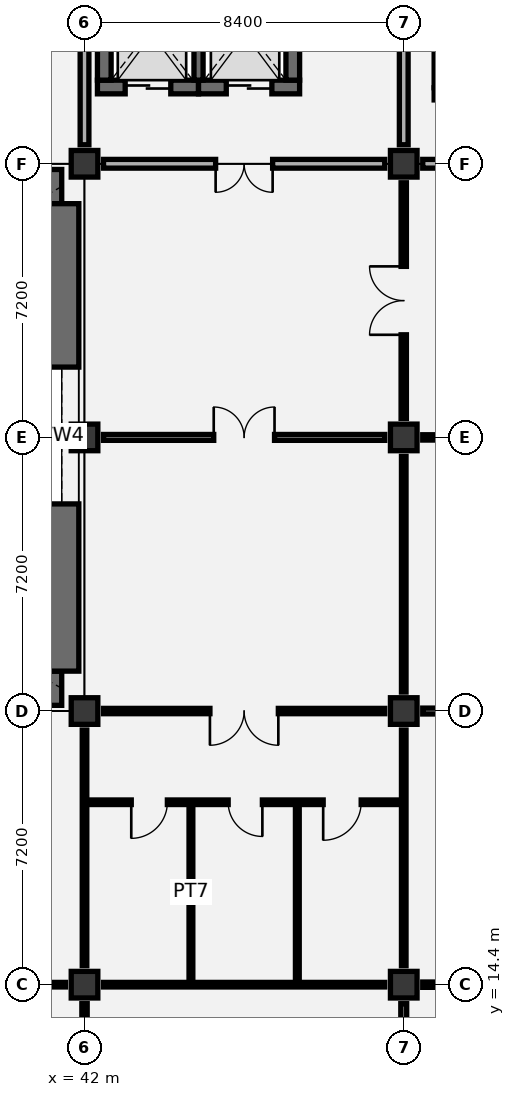
"""IFC4 building model, lengths in metres.
Left out: names, types, materials, properties, quantities, classifications, styles, units other than length and angle.
Written with IfcOpenShell. Run it as: python <this file> out.ifc"""

import sys

from ifc_helpers import new_model, si_unit, direction, frame, frame_2d, origin, origin_2d, place, context, subcontext, project, spatial, rectangle, extrude, element, fill, save


model = new_model("IFC4")
c1 = context("Model", 3, precision=1e-05, world=origin(), true_north=direction((0.0, 1.0)))
c2 = subcontext(c1, "Body", "Model", "MODEL_VIEW")
j1 = project(units=[si_unit("LENGTHUNIT", "METRE"), si_unit("PLANEANGLEUNIT", "RADIAN")], contexts=[c1])
p1 = place(None, origin())
s1 = spatial("IfcSite", under=j1, at=p1, CompositionType="ELEMENT")
p2 = place(p1, origin())
s2 = spatial("IfcBuilding", under=s1, at=p2, CompositionType="ELEMENT")
p3 = place(p2, origin())
s3 = spatial("IfcBuildingStorey", under=s2, at=p3, CompositionType="ELEMENT", Elevation=0.0)
for number, where, z_axis, x_axis in (
    (1, (42.0, 14.4, 0.0), (0.0, 0.0, 1.0), (1.0, 0.0, 0.0)),
    (2, (42.0, 21.6, 0.0), (0.0, 0.0, 1.0), (1.0, 0.0, 0.0)),
    (3, (42.0, 28.8, 0.0), (0.0, 0.0, 1.0), (1.0, 0.0, 0.0)),
    (4, (42.0, 36.0, 0.0), (0.0, 0.0, 1.0), (1.0, 0.0, 0.0)),
    (5, (50.4, 14.4, 0.0), (0.0, 0.0, 1.0), (1.0, 0.0, 0.0)),
    (6, (50.4, 21.6, 0.0), (0.0, 0.0, 1.0), (1.0, 0.0, 0.0)),
    (7, (50.4, 28.8, 0.0), (0.0, 0.0, 1.0), (1.0, 0.0, 0.0)),
    (8, (50.4, 36.0, 0.0), (0.0, 0.0, 1.0), (1.0, 0.0, 0.0)),
):
    element("IfcColumn", number, at=place(p3, frame(where, z_axis=z_axis, x_axis=x_axis)), inside=s3, PredefinedType="COLUMN", context=c2, shape_type="SweptSolid", body=[
        extrude(rectangle(XDim=0.7, YDim=0.7, at=origin_2d()), origin(), (0.0, 0.0, 1.0), 6.0),
    ])
p4 = place(p3, frame((17.4, 22.2, 0.0), z_axis=(0.0, 0.0, 1.0), x_axis=(1.0, 0.0, 0.0)))
e9 = element("IfcWall", 9, at=p4, inside=s3, PredefinedType="SOLIDWALL", context=c2, shape_type="SweptSolid", body=[
    extrude(rectangle(XDim=24.0, YDim=0.9, at=frame_2d((12.0, 0.0))), origin(), (0.0, 0.0, 1.0), 6.0),
])
p5 = place(p4, frame((2.4, 0.0, 0.8)))
e10 = element("IfcOpeningElement", 10, at=p5, cuts=e9, PredefinedType="OPENING", context=c2, shape_type="SweptSolid", body=[
    extrude(rectangle(XDim=6.4, YDim=3.2, at=frame_2d((3.2, 1.6))), frame((0.0, 0.46, 0.0), z_axis=(0.0, -1.0, 0.0), x_axis=(1.0, 0.0, 0.0)), (0.0, 0.0, 1.0), 0.92),
])
p6 = place(p4, frame((14.2, 0.0, 0.8)))
e11 = element("IfcOpeningElement", 11, at=p6, cuts=e9, PredefinedType="OPENING", context=c2, shape_type="SweptSolid", body=[
    extrude(rectangle(XDim=6.4, YDim=3.2, at=frame_2d((3.2, 1.6))), frame((0.0, 0.46, 0.0), z_axis=(0.0, -1.0, 0.0), x_axis=(1.0, 0.0, 0.0)), (0.0, 0.0, 1.0), 0.92),
])
p7 = place(p3, frame((17.4, 35.4, 0.0), z_axis=(0.0, 0.0, 1.0), x_axis=(1.0, 0.0, 0.0)))
e12 = element("IfcWall", 12, at=p7, inside=s3, PredefinedType="SOLIDWALL", context=c2, shape_type="SweptSolid", body=[
    extrude(rectangle(XDim=24.0, YDim=0.9, at=frame_2d((12.0, 0.0))), origin(), (0.0, 0.0, 1.0), 6.0),
])
p8 = place(p7, frame((2.4, 0.0, 0.8)))
e13 = element("IfcOpeningElement", 13, at=p8, cuts=e12, PredefinedType="OPENING", context=c2, shape_type="SweptSolid", body=[
    extrude(rectangle(XDim=6.4, YDim=3.2, at=frame_2d((3.2, 1.6))), frame((0.0, 0.46, 0.0), z_axis=(0.0, -1.0, 0.0), x_axis=(1.0, 0.0, 0.0)), (0.0, 0.0, 1.0), 0.92),
])
p9 = place(p7, frame((14.2, 0.0, 0.8)))
e14 = element("IfcOpeningElement", 14, at=p9, cuts=e12, PredefinedType="OPENING", context=c2, shape_type="SweptSolid", body=[
    extrude(rectangle(XDim=6.4, YDim=3.2, at=frame_2d((3.2, 1.6))), frame((0.0, 0.46, 0.0), z_axis=(0.0, -1.0, 0.0), x_axis=(1.0, 0.0, 0.0)), (0.0, 0.0, 1.0), 0.92),
])
p10 = place(p3, frame((41.4, 22.65, 0.0), z_axis=(0.0, 0.0, 1.0), x_axis=(0.0, 1.0, 0.0)))
e15 = element("IfcWall", 15, at=p10, inside=s3, PredefinedType="SOLIDWALL", context=c2, shape_type="SweptSolid", body=[
    extrude(rectangle(XDim=12.3, YDim=0.9, at=frame_2d((6.15, 0.0))), origin(), (0.0, 0.0, 1.0), 6.0),
])
p11 = place(p10, frame((4.4, 0.0, 0.9)))
e16 = element("IfcOpeningElement", 16, at=p11, cuts=e15, PredefinedType="OPENING", context=c2, shape_type="SweptSolid", body=[
    extrude(rectangle(XDim=3.6, YDim=2.6, at=frame_2d((1.8, 1.3))), frame((0.0, 0.46, 0.0), z_axis=(0.0, -1.0, 0.0), x_axis=(1.0, 0.0, 0.0)), (0.0, 0.0, 1.0), 0.92),
])
p12 = place(p3, frame((51.2, 37.84, 0.0), z_axis=(0.0, 0.0, 1.0), x_axis=(1.0, 0.0, 0.0)))
e17 = element("IfcWall", 17, at=p12, inside=s3, PredefinedType="SHEAR", context=c2, shape_type="SweptSolid", body=[
    extrude(rectangle(XDim=7.48, YDim=0.32, at=frame_2d((3.74, 0.0))), origin(), (0.0, 0.0, 1.0), 5.675),
])
p13 = place(p12, frame((0.45, 0.0, 0.0)))
e18 = element("IfcOpeningElement", 18, at=p13, cuts=e17, PredefinedType="OPENING", context=c2, shape_type="SweptSolid", body=[
    extrude(rectangle(XDim=1.05, YDim=2.15, at=frame_2d((0.525, 1.075))), frame((0.0, 0.17, 0.0), z_axis=(0.0, -1.0, 0.0), x_axis=(1.0, 0.0, 0.0)), (0.0, 0.0, 1.0), 0.34),
])
p14 = place(p3, frame((51.36, 38.0, 0.0), z_axis=(0.0, 0.0, 1.0), x_axis=(0.0, 1.0, 0.0)))
e19 = element("IfcWall", 19, at=p14, inside=s3, PredefinedType="SHEAR", context=c2, shape_type="SweptSolid", body=[
    extrude(rectangle(XDim=3.8, YDim=0.32, at=frame_2d((1.9, 0.0))), origin(), (0.0, 0.0, 1.0), 5.675),
])
p15 = place(p3, frame((42.34, 38.02, 0.0), z_axis=(0.0, 0.0, 1.0), x_axis=(1.0, 0.0, 0.0)))
e20 = element("IfcWall", 20, at=p15, inside=s3, PredefinedType="SHEAR", context=c2, shape_type="SweptSolid", body=[
    extrude(rectangle(XDim=2.66, YDim=0.36, at=frame_2d((1.33, 0.0))), origin(), (0.0, 0.0, 1.0), 5.675),
])
p16 = place(p15, frame((0.73, 0.0, 0.0)))
e21 = element("IfcOpeningElement", 21, at=p16, cuts=e20, PredefinedType="OPENING", context=c2, shape_type="SweptSolid", body=[
    extrude(rectangle(XDim=1.2, YDim=2.15, at=frame_2d((0.6, 1.075))), frame((0.0, 0.19, 0.0), z_axis=(0.0, -1.0, 0.0), x_axis=(1.0, 0.0, 0.0)), (0.0, 0.0, 1.0), 0.38),
])
p17 = place(p3, frame((45.0, 38.02, 0.0), z_axis=(0.0, 0.0, 1.0), x_axis=(1.0, 0.0, 0.0)))
e22 = element("IfcWall", 22, at=p17, inside=s3, PredefinedType="SHEAR", context=c2, shape_type="SweptSolid", body=[
    extrude(rectangle(XDim=2.66, YDim=0.36, at=frame_2d((1.33, 0.0))), origin(), (0.0, 0.0, 1.0), 5.675),
])
p18 = place(p17, frame((0.73, 0.0, 0.0)))
e23 = element("IfcOpeningElement", 23, at=p18, cuts=e22, PredefinedType="OPENING", context=c2, shape_type="SweptSolid", body=[
    extrude(rectangle(XDim=1.2, YDim=2.15, at=frame_2d((0.6, 1.075))), frame((0.0, 0.19, 0.0), z_axis=(0.0, -1.0, 0.0), x_axis=(1.0, 0.0, 0.0)), (0.0, 0.0, 1.0), 0.38),
])
for number, where, z_axis, x_axis in (
    (24, (42.52, 38.2, 0.0), (0.0, 0.0, 1.0), (0.0, 1.0, 0.0)),
    (25, (47.48, 38.2, 0.0), (0.0, 0.0, 1.0), (0.0, 1.0, 0.0)),
):
    element("IfcWall", number, at=place(p3, frame(where, z_axis=z_axis, x_axis=x_axis)), inside=s3, PredefinedType="SHEAR", context=c2, shape_type="SweptSolid", body=[
        extrude(rectangle(XDim=2.8, YDim=0.36, at=frame_2d((1.4, 0.0))), origin(), (0.0, 0.0, 1.0), 5.675),
    ])
p19 = place(p3, frame((45.0, 38.2, 0.0), z_axis=(0.0, 0.0, 1.0), x_axis=(0.0, 1.0, 0.0)))
e26 = element("IfcWall", 26, at=p19, inside=s3, PredefinedType="SHEAR", context=c2, shape_type="SweptSolid", body=[
    extrude(rectangle(XDim=2.8, YDim=0.24, at=frame_2d((1.4, 0.0))), origin(), (0.0, 0.0, 1.0), 5.675),
])
p20 = place(p3, frame((42.15, 19.2, 0.0), z_axis=(0.0, 0.0, 1.0), x_axis=(1.0, 0.0, 0.0)))
e27 = element("IfcWall", 27, at=p20, inside=s3, PredefinedType="PARTITIONING", context=c2, shape_type="SweptSolid", body=[
    extrude(rectangle(XDim=8.1, YDim=0.12, at=frame_2d((4.05, 0.0))), origin(), (0.0, 0.0, 1.0), 5.675),
])
p21 = place(p20, frame((1.08, 0.0, 0.0)))
e28 = element("IfcOpeningElement", 28, at=p21, cuts=e27, PredefinedType="OPENING", context=c2, shape_type="SweptSolid", body=[
    extrude(rectangle(XDim=0.95, YDim=2.1, at=frame_2d((0.475, 1.05))), frame((0.0, 0.07, 0.0), z_axis=(0.0, -1.0, 0.0), x_axis=(1.0, 0.0, 0.0)), (0.0, 0.0, 1.0), 0.14),
])
p22 = place(p20, frame((3.63, 0.0, 0.0)))
e29 = element("IfcOpeningElement", 29, at=p22, cuts=e27, PredefinedType="OPENING", context=c2, shape_type="SweptSolid", body=[
    extrude(rectangle(XDim=0.9, YDim=2.1, at=frame_2d((0.45, 1.05))), frame((0.0, 0.07, 0.0), z_axis=(0.0, -1.0, 0.0), x_axis=(1.0, 0.0, 0.0)), (0.0, 0.0, 1.0), 0.14),
])
p23 = place(p20, frame((6.13, 0.0, 0.0)))
e30 = element("IfcOpeningElement", 30, at=p23, cuts=e27, PredefinedType="OPENING", context=c2, shape_type="SweptSolid", body=[
    extrude(rectangle(XDim=1.0, YDim=2.1, at=frame_2d((0.5, 1.05))), frame((0.0, 0.07, 0.0), z_axis=(0.0, -1.0, 0.0), x_axis=(1.0, 0.0, 0.0)), (0.0, 0.0, 1.0), 0.14),
])
for number, where, z_axis, x_axis in (
    (31, (44.8, 14.55, 0.0), (0.0, 0.0, 1.0), (0.0, 1.0, 0.0)),
    (32, (47.6, 14.55, 0.0), (0.0, 0.0, 1.0), (0.0, 1.0, 0.0)),
):
    element("IfcWall", number, at=place(p3, frame(where, z_axis=z_axis, x_axis=x_axis)), inside=s3, PredefinedType="PARTITIONING", context=c2, shape_type="SweptSolid", body=[
        extrude(rectangle(XDim=4.59, YDim=0.1, at=frame_2d((2.295, 0.0))), origin(), (0.0, 0.0, 1.0), 5.675),
    ])
p24 = place(p3, frame((42.0, 7.7, 0.0), z_axis=(0.0, 0.0, 1.0), x_axis=(0.0, 1.0, 0.0)))
e33 = element("IfcWall", 33, at=p24, inside=s3, PredefinedType="PARTITIONING", context=c2, shape_type="SweptSolid", body=[
    extrude(rectangle(XDim=6.2, YDim=0.14, at=frame_2d((3.1, 0.0))), origin(), (0.0, 0.0, 1.0), 5.27),
])
p25 = place(p24, frame((2.3, 0.0, 0.0)))
e34 = element("IfcOpeningElement", 34, at=p25, cuts=e33, PredefinedType="OPENING", context=c2, shape_type="SweptSolid", body=[
    extrude(rectangle(XDim=1.6, YDim=2.2, at=frame_2d((0.8, 1.1))), frame((0.0, 0.08, 0.0), z_axis=(0.0, -1.0, 0.0), x_axis=(1.0, 0.0, 0.0)), (0.0, 0.0, 1.0), 0.16),
])
p26 = place(p3, frame((34.1, 14.4, 0.0), z_axis=(0.0, 0.0, 1.0), x_axis=(1.0, 0.0, 0.0)))
e35 = element("IfcWall", 35, at=p26, inside=s3, PredefinedType="PARTITIONING", context=c2, shape_type="SweptSolid", body=[
    extrude(rectangle(XDim=7.4, YDim=0.12, at=frame_2d((3.7, 0.0))), origin(), (0.0, 0.0, 1.0), 5.02),
])
p27 = place(p3, frame((42.0, 14.9, 0.0), z_axis=(0.0, 0.0, 1.0), x_axis=(0.0, 1.0, 0.0)))
e36 = element("IfcWall", 36, at=p27, inside=s3, PredefinedType="PARTITIONING", context=c2, shape_type="SweptSolid", body=[
    extrude(rectangle(XDim=6.2, YDim=0.12, at=frame_2d((3.1, 0.0))), origin(), (0.0, 0.0, 1.0), 5.02),
])
p28 = place(p3, frame((42.0, 36.5, 0.0), z_axis=(0.0, 0.0, 1.0), x_axis=(0.0, 1.0, 0.0)))
e37 = element("IfcWall", 37, at=p28, inside=s3, PredefinedType="PARTITIONING", context=c2, shape_type="SweptSolid", body=[
    extrude(rectangle(XDim=6.2, YDim=0.23, at=frame_2d((3.1, 0.0))), origin(), (0.0, 0.0, 1.0), 5.17),
])
p29 = place(p3, frame((50.4, 7.7, 0.0), z_axis=(0.0, 0.0, 1.0), x_axis=(0.0, 1.0, 0.0)))
e38 = element("IfcWall", 38, at=p29, inside=s3, PredefinedType="PARTITIONING", context=c2, shape_type="SweptSolid", body=[
    extrude(rectangle(XDim=6.2, YDim=0.155, at=frame_2d((3.1, 0.0))), origin(), (0.0, 0.0, 1.0), 4.92),
])
p30 = place(p29, frame((2.3, 0.0, 0.0)))
e39 = element("IfcOpeningElement", 39, at=p30, cuts=e38, PredefinedType="OPENING", context=c2, shape_type="SweptSolid", body=[
    extrude(rectangle(XDim=1.6, YDim=2.2, at=frame_2d((0.8, 1.1))), frame((0.0, 0.087, 0.0), z_axis=(0.0, -1.0, 0.0), x_axis=(1.0, 0.0, 0.0)), (0.0, 0.0, 1.0), 0.175),
])
p31 = place(p3, frame((42.5, 14.4, 0.0), z_axis=(0.0, 0.0, 1.0), x_axis=(1.0, 0.0, 0.0)))
e40 = element("IfcWall", 40, at=p31, inside=s3, PredefinedType="PARTITIONING", context=c2, shape_type="SweptSolid", body=[
    extrude(rectangle(XDim=7.4, YDim=0.12, at=frame_2d((3.7, 0.0))), origin(), (0.0, 0.0, 1.0), 4.87),
])
p32 = place(p3, frame((50.4, 14.9, 0.0), z_axis=(0.0, 0.0, 1.0), x_axis=(0.0, 1.0, 0.0)))
e41 = element("IfcWall", 41, at=p32, inside=s3, PredefinedType="PARTITIONING", context=c2, shape_type="SweptSolid", body=[
    extrude(rectangle(XDim=6.2, YDim=0.12, at=frame_2d((3.1, 0.0))), origin(), (0.0, 0.0, 1.0), 5.38),
])
p33 = place(p3, frame((42.5, 21.6, 0.0), z_axis=(0.0, 0.0, 1.0), x_axis=(1.0, 0.0, 0.0)))
e42 = element("IfcWall", 42, at=p33, inside=s3, PredefinedType="PARTITIONING", context=c2, shape_type="SweptSolid", body=[
    extrude(rectangle(XDim=7.4, YDim=0.14, at=frame_2d((3.7, 0.0))), origin(), (0.0, 0.0, 1.0), 4.87),
])
p34 = place(p33, frame((2.8, 0.0, 0.0)))
e43 = element("IfcOpeningElement", 43, at=p34, cuts=e42, PredefinedType="OPENING", context=c2, shape_type="SweptSolid", body=[
    extrude(rectangle(XDim=1.8, YDim=2.25, at=frame_2d((0.9, 1.125))), frame((0.0, 0.08, 0.0), z_axis=(0.0, -1.0, 0.0), x_axis=(1.0, 0.0, 0.0)), (0.0, 0.0, 1.0), 0.16),
])
p35 = place(p3, frame((50.4, 22.1, 0.0), z_axis=(0.0, 0.0, 1.0), x_axis=(0.0, 1.0, 0.0)))
e44 = element("IfcWall", 44, at=p35, inside=s3, PredefinedType="PARTITIONING", context=c2, shape_type="SweptSolid", body=[
    extrude(rectangle(XDim=6.2, YDim=0.12, at=frame_2d((3.1, 0.0))), origin(), (0.0, 0.0, 1.0), 4.92),
])
p36 = place(p3, frame((42.5, 28.8, 0.0), z_axis=(0.0, 0.0, 1.0), x_axis=(1.0, 0.0, 0.0)))
e45 = element("IfcWall", 45, at=p36, inside=s3, PredefinedType="PARTITIONING", context=c2, shape_type="SweptSolid", body=[
    extrude(rectangle(XDim=7.4, YDim=0.155, at=frame_2d((3.7, 0.0))), origin(), (0.0, 0.0, 1.0), 4.87),
])
p37 = place(p36, frame((2.9, 0.0, 0.0)))
e46 = element("IfcOpeningElement", 46, at=p37, cuts=e45, PredefinedType="OPENING", context=c2, shape_type="SweptSolid", body=[
    extrude(rectangle(XDim=1.6, YDim=2.2, at=frame_2d((0.8, 1.1))), frame((0.0, 0.087, 0.0), z_axis=(0.0, -1.0, 0.0), x_axis=(1.0, 0.0, 0.0)), (0.0, 0.0, 1.0), 0.175),
])
p38 = place(p3, frame((50.4, 29.3, 0.0), z_axis=(0.0, 0.0, 1.0), x_axis=(0.0, 1.0, 0.0)))
e47 = element("IfcWall", 47, at=p38, inside=s3, PredefinedType="PARTITIONING", context=c2, shape_type="SweptSolid", body=[
    extrude(rectangle(XDim=6.2, YDim=0.14, at=frame_2d((3.1, 0.0))), origin(), (0.0, 0.0, 1.0), 5.17),
])
p39 = place(p38, frame((2.2, 0.0, 0.0)))
e48 = element("IfcOpeningElement", 48, at=p39, cuts=e47, PredefinedType="OPENING", context=c2, shape_type="SweptSolid", body=[
    extrude(rectangle(XDim=1.8, YDim=2.25, at=frame_2d((0.9, 1.125))), frame((0.0, 0.08, 0.0), z_axis=(0.0, -1.0, 0.0), x_axis=(1.0, 0.0, 0.0)), (0.0, 0.0, 1.0), 0.16),
])
p40 = place(p3, frame((42.5, 36.0, 0.0), z_axis=(0.0, 0.0, 1.0), x_axis=(1.0, 0.0, 0.0)))
e49 = element("IfcWall", 49, at=p40, inside=s3, PredefinedType="PARTITIONING", context=c2, shape_type="SweptSolid", body=[
    extrude(rectangle(XDim=7.4, YDim=0.23, at=frame_2d((3.7, 0.0))), origin(), (0.0, 0.0, 1.0), 4.87),
])
p41 = place(p40, frame((2.95, 0.0, 0.0)))
e50 = element("IfcOpeningElement", 50, at=p41, cuts=e49, PredefinedType="OPENING", context=c2, shape_type="SweptSolid", body=[
    extrude(rectangle(XDim=1.5, YDim=2.15, at=frame_2d((0.75, 1.075))), frame((0.0, 0.125, 0.0), z_axis=(0.0, -1.0, 0.0), x_axis=(1.0, 0.0, 0.0)), (0.0, 0.0, 1.0), 0.25),
])
p42 = place(p3, frame((50.4, 36.5, 0.0), z_axis=(0.0, 0.0, 1.0), x_axis=(0.0, 1.0, 0.0)))
e51 = element("IfcWall", 51, at=p42, inside=s3, PredefinedType="PARTITIONING", context=c2, shape_type="SweptSolid", body=[
    extrude(rectangle(XDim=6.2, YDim=0.23, at=frame_2d((3.1, 0.0))), origin(), (0.0, 0.0, 1.0), 4.92),
])
p43 = place(p3, frame((50.9, 14.4, 0.0), z_axis=(0.0, 0.0, 1.0), x_axis=(1.0, 0.0, 0.0)))
e52 = element("IfcWall", 52, at=p43, inside=s3, PredefinedType="PARTITIONING", context=c2, shape_type="SweptSolid", body=[
    extrude(rectangle(XDim=7.4, YDim=0.14, at=frame_2d((3.7, 0.0))), origin(), (0.0, 0.0, 1.0), 4.87),
])
p44 = place(p43, frame((2.9, 0.0, 0.0)))
e53 = element("IfcOpeningElement", 53, at=p44, cuts=e52, PredefinedType="OPENING", context=c2, shape_type="SweptSolid", body=[
    extrude(rectangle(XDim=1.6, YDim=2.2, at=frame_2d((0.8, 1.1))), frame((0.0, 0.08, 0.0), z_axis=(0.0, -1.0, 0.0), x_axis=(1.0, 0.0, 0.0)), (0.0, 0.0, 1.0), 0.16),
])
p45 = place(p3, frame((50.9, 21.6, 0.0), z_axis=(0.0, 0.0, 1.0), x_axis=(1.0, 0.0, 0.0)))
e54 = element("IfcWall", 54, at=p45, inside=s3, PredefinedType="PARTITIONING", context=c2, shape_type="SweptSolid", body=[
    extrude(rectangle(XDim=7.4, YDim=0.155, at=frame_2d((3.7, 0.0))), origin(), (0.0, 0.0, 1.0), 4.87),
])
p46 = place(p45, frame((2.8, 0.0, 0.0)))
e55 = element("IfcOpeningElement", 55, at=p46, cuts=e54, PredefinedType="OPENING", context=c2, shape_type="SweptSolid", body=[
    extrude(rectangle(XDim=1.8, YDim=2.25, at=frame_2d((0.9, 1.125))), frame((0.0, 0.087, 0.0), z_axis=(0.0, -1.0, 0.0), x_axis=(1.0, 0.0, 0.0)), (0.0, 0.0, 1.0), 0.175),
])
p47 = place(p3, frame((50.9, 28.8, 0.0), z_axis=(0.0, 0.0, 1.0), x_axis=(1.0, 0.0, 0.0)))
e56 = element("IfcWall", 56, at=p47, inside=s3, PredefinedType="PARTITIONING", context=c2, shape_type="SweptSolid", body=[
    extrude(rectangle(XDim=7.4, YDim=0.14, at=frame_2d((3.7, 0.0))), origin(), (0.0, 0.0, 1.0), 4.87),
])
p48 = place(p47, frame((2.9, 0.0, 0.0)))
e57 = element("IfcOpeningElement", 57, at=p48, cuts=e56, PredefinedType="OPENING", context=c2, shape_type="SweptSolid", body=[
    extrude(rectangle(XDim=1.6, YDim=2.2, at=frame_2d((0.8, 1.1))), frame((0.0, 0.08, 0.0), z_axis=(0.0, -1.0, 0.0), x_axis=(1.0, 0.0, 0.0)), (0.0, 0.0, 1.0), 0.16),
])
p49 = place(p3, frame((50.9, 36.0, 0.0), z_axis=(0.0, 0.0, 1.0), x_axis=(1.0, 0.0, 0.0)))
e58 = element("IfcWall", 58, at=p49, inside=s3, PredefinedType="PARTITIONING", context=c2, shape_type="SweptSolid", body=[
    extrude(rectangle(XDim=7.4, YDim=0.23, at=frame_2d((3.7, 0.0))), origin(), (0.0, 0.0, 1.0), 4.87),
])
p50 = place(p49, frame((2.95, 0.0, 0.0)))
e59 = element("IfcOpeningElement", 59, at=p50, cuts=e58, PredefinedType="OPENING", context=c2, shape_type="SweptSolid", body=[
    extrude(rectangle(XDim=1.5, YDim=2.15, at=frame_2d((0.75, 1.075))), frame((0.0, 0.125, 0.0), z_axis=(0.0, -1.0, 0.0), x_axis=(1.0, 0.0, 0.0)), (0.0, 0.0, 1.0), 0.25),
])
p51 = place(p11, origin())
e60 = element("IfcWindow", 60, at=p51, inside=s3, PartitioningType="SINGLE_PANEL", PredefinedType="WINDOW", context=c2, shape_type="SweptSolid", body=[
    extrude(rectangle(XDim=3.6, YDim=2.6, at=frame_2d((1.8, 1.3))), frame((0.0, 0.175, 0.0), z_axis=(0.0, -1.0, 0.0), x_axis=(1.0, 0.0, 0.0)), (0.0, 0.0, 1.0), 0.35),
])
fill(e16, e60)
p52 = place(p16, origin())
e61 = element("IfcDoor", 61, at=p52, inside=s3, OperationType="DOUBLE_DOOR_SLIDING", PredefinedType="DOOR", context=c2, shape_type="SweptSolid", body=[
    extrude(rectangle(XDim=1.2, YDim=2.15, at=frame_2d((0.6, 1.075))), frame((0.0, 0.025, 0.0), z_axis=(0.0, -1.0, 0.0), x_axis=(1.0, 0.0, 0.0)), (0.0, 0.0, 1.0), 0.05),
])
fill(e21, e61)
p53 = place(p18, origin())
e62 = element("IfcDoor", 62, at=p53, inside=s3, OperationType="DOUBLE_DOOR_SLIDING", PredefinedType="DOOR", context=c2, shape_type="SweptSolid", body=[
    extrude(rectangle(XDim=1.2, YDim=2.15, at=frame_2d((0.6, 1.075))), frame((0.0, 0.025, 0.0), z_axis=(0.0, -1.0, 0.0), x_axis=(1.0, 0.0, 0.0)), (0.0, 0.0, 1.0), 0.05),
])
fill(e23, e62)
p54 = place(p21, frame((0.95, 0.0, 0.0), z_axis=(0.0, 0.0, 1.0), x_axis=(-1.0, 0.0, 0.0)))
e63 = element("IfcDoor", 63, at=p54, inside=s3, OperationType="SINGLE_SWING_RIGHT", PredefinedType="DOOR", context=c2, shape_type="SweptSolid", body=[
    extrude(rectangle(XDim=0.95, YDim=2.1, at=frame_2d((0.475, 1.05))), frame((0.0, 0.025, 0.0), z_axis=(0.0, -1.0, 0.0), x_axis=(1.0, 0.0, 0.0)), (0.0, 0.0, 1.0), 0.05),
])
fill(e28, e63)
p55 = place(p22, frame((0.9, 0.0, 0.0), z_axis=(0.0, 0.0, 1.0), x_axis=(-1.0, 0.0, 0.0)))
e64 = element("IfcDoor", 64, at=p55, inside=s3, OperationType="SINGLE_SWING_LEFT", PredefinedType="DOOR", context=c2, shape_type="SweptSolid", body=[
    extrude(rectangle(XDim=0.9, YDim=2.1, at=frame_2d((0.45, 1.05))), frame((0.0, 0.025, 0.0), z_axis=(0.0, -1.0, 0.0), x_axis=(1.0, 0.0, 0.0)), (0.0, 0.0, 1.0), 0.05),
])
fill(e29, e64)
p56 = place(p23, frame((1.0, 0.0, 0.0), z_axis=(0.0, 0.0, 1.0), x_axis=(-1.0, 0.0, 0.0)))
e65 = element("IfcDoor", 65, at=p56, inside=s3, OperationType="SINGLE_SWING_RIGHT", PredefinedType="DOOR", context=c2, shape_type="SweptSolid", body=[
    extrude(rectangle(XDim=1.0, YDim=2.1, at=frame_2d((0.5, 1.05))), frame((0.0, 0.025, 0.0), z_axis=(0.0, -1.0, 0.0), x_axis=(1.0, 0.0, 0.0)), (0.0, 0.0, 1.0), 0.05),
])
fill(e30, e65)
p57 = place(p34, frame((1.8, 0.0, 0.0), z_axis=(0.0, 0.0, 1.0), x_axis=(-1.0, 0.0, 0.0)))
e66 = element("IfcDoor", 66, at=p57, inside=s3, OperationType="DOUBLE_DOOR_SINGLE_SWING", PredefinedType="DOOR", context=c2, shape_type="SweptSolid", body=[
    extrude(rectangle(XDim=1.8, YDim=2.25, at=frame_2d((0.9, 1.125))), frame((0.0, 0.025, 0.0), z_axis=(0.0, -1.0, 0.0), x_axis=(1.0, 0.0, 0.0)), (0.0, 0.0, 1.0), 0.05),
])
fill(e43, e66)
p58 = place(p37, origin())
e67 = element("IfcDoor", 67, at=p58, inside=s3, OperationType="DOUBLE_DOOR_SINGLE_SWING", PredefinedType="DOOR", context=c2, shape_type="SweptSolid", body=[
    extrude(rectangle(XDim=1.6, YDim=2.2, at=frame_2d((0.8, 1.1))), frame((0.0, 0.025, 0.0), z_axis=(0.0, -1.0, 0.0), x_axis=(1.0, 0.0, 0.0)), (0.0, 0.0, 1.0), 0.05),
])
fill(e46, e67)
p59 = place(p39, origin())
e68 = element("IfcDoor", 68, at=p59, inside=s3, OperationType="DOUBLE_DOOR_SINGLE_SWING", PredefinedType="DOOR", context=c2, shape_type="SweptSolid", body=[
    extrude(rectangle(XDim=1.8, YDim=2.25, at=frame_2d((0.9, 1.125))), frame((0.0, 0.025, 0.0), z_axis=(0.0, -1.0, 0.0), x_axis=(1.0, 0.0, 0.0)), (0.0, 0.0, 1.0), 0.05),
])
fill(e48, e68)
p60 = place(p41, frame((1.5, 0.0, 0.0), z_axis=(0.0, 0.0, 1.0), x_axis=(-1.0, 0.0, 0.0)))
e69 = element("IfcDoor", 69, at=p60, inside=s3, OperationType="DOUBLE_DOOR_SINGLE_SWING", PredefinedType="DOOR", context=c2, shape_type="SweptSolid", body=[
    extrude(rectangle(XDim=1.5, YDim=2.15, at=frame_2d((0.75, 1.075))), frame((0.0, 0.025, 0.0), z_axis=(0.0, -1.0, 0.0), x_axis=(1.0, 0.0, 0.0)), (0.0, 0.0, 1.0), 0.05),
])
fill(e50, e69)
save(model, sys.argv[1])
